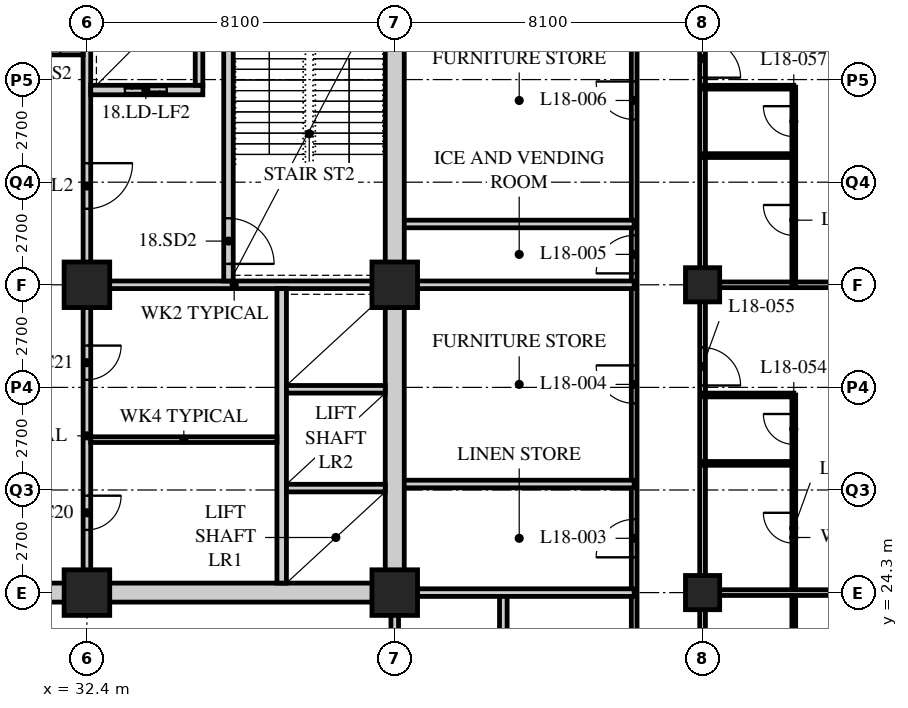
"""IFC4 building model, lengths in metres.
Left out: names, types, materials, properties, quantities, classifications, styles, units other than length and angle.
Written with IfcOpenShell. Run it as: python <this file> out.ifc"""

import sys

from ifc_helpers import new_model, si_unit, direction, frame, frame_2d, origin, origin_2d, place, context, subcontext, project, spatial, rectangle, hollow_rectangle, extrude, element, fill, save


model = new_model("IFC4")
c1 = context("Model", 3, precision=1e-05, world=origin(), true_north=direction((0.0, 1.0)))
c2 = subcontext(c1, "Body", "Model", "MODEL_VIEW")
j1 = project(units=[si_unit("LENGTHUNIT", "METRE"), si_unit("PLANEANGLEUNIT", "RADIAN")], contexts=[c1])
p1 = place(None, origin())
s1 = spatial("IfcSite", under=j1, at=p1, CompositionType="ELEMENT")
p2 = place(p1, origin())
s2 = spatial("IfcBuilding", under=s1, at=p2, CompositionType="ELEMENT")
p3 = place(p2, frame((0.0, 0.0, 73.8)))
s3 = spatial("IfcBuildingStorey", under=s2, at=p3, CompositionType="ELEMENT", Elevation=73.8)
for number, where, z_axis, x_axis in (
    (1, (32.4, 24.3, 0.0), (0.0, 0.0, 1.0), (1.0, 0.0, 0.0)),
    (2, (32.4, 32.4, 0.0), (0.0, 0.0, 1.0), (1.0, 0.0, 0.0)),
    (3, (40.5, 24.3, 0.0), (0.0, 0.0, 1.0), (1.0, 0.0, 0.0)),
    (4, (40.5, 32.4, 0.0), (0.0, 0.0, 1.0), (1.0, 0.0, 0.0)),
):
    element("IfcColumn", number, at=place(p3, frame(where, z_axis=z_axis, x_axis=x_axis)), inside=s3, PredefinedType="COLUMN", context=c2, shape_type="SweptSolid", body=[
        extrude(hollow_rectangle(XDim=1.2, YDim=1.2, WallThickness=0.12, at=origin_2d()), origin(), (0.0, 0.0, 1.0), 3.4),
    ])
for number, where, z_axis, x_axis in (
    (5, (48.6, 24.3, 0.0), (0.0, 0.0, 1.0), (1.0, 0.0, 0.0)),
    (6, (48.6, 32.4, 0.0), (0.0, 0.0, 1.0), (1.0, 0.0, 0.0)),
):
    element("IfcColumn", number, at=place(p3, frame(where, z_axis=z_axis, x_axis=x_axis)), inside=s3, PredefinedType="COLUMN", context=c2, shape_type="SweptSolid", body=[
        extrude(hollow_rectangle(XDim=0.9, YDim=0.9, WallThickness=0.09, at=origin_2d()), origin(), (0.0, 0.0, 1.0), 3.4),
    ])
p4 = place(p3, frame((48.6, 16.2, 0.0), z_axis=(0.0, 0.0, 1.0), x_axis=(0.0, 1.0, 0.0)))
e7 = element("IfcWall", 7, at=p4, inside=s3, PredefinedType="PARTITIONING", context=c2, shape_type="SweptSolid", body=[
    extrude(rectangle(XDim=26.1, YDim=0.15, at=frame_2d((13.05, 0.0))), origin(), (0.0, 0.0, 1.0), 2.578),
])
p5 = place(p4, frame((2.75, 0.0, 0.0)))
e8 = element("IfcOpeningElement", 8, at=p5, cuts=e7, PredefinedType="OPENING", context=c2, shape_type="SweptSolid", body=[
    extrude(rectangle(XDim=1.0, YDim=2.1, at=frame_2d((0.5, 1.05))), frame((0.0, 0.085, 0.0), z_axis=(0.0, -1.0, 0.0), x_axis=(1.0, 0.0, 0.0)), (0.0, 0.0, 1.0), 0.17),
])
p6 = place(p4, frame((4.65, 0.0, 0.0)))
e9 = element("IfcOpeningElement", 9, at=p6, cuts=e7, PredefinedType="OPENING", context=c2, shape_type="SweptSolid", body=[
    extrude(rectangle(XDim=1.0, YDim=2.1, at=frame_2d((0.5, 1.05))), frame((0.0, 0.085, 0.0), z_axis=(0.0, -1.0, 0.0), x_axis=(1.0, 0.0, 0.0)), (0.0, 0.0, 1.0), 0.17),
])
p7 = place(p4, frame((13.55, 0.0, 0.0)))
e10 = element("IfcOpeningElement", 10, at=p7, cuts=e7, PredefinedType="OPENING", context=c2, shape_type="SweptSolid", body=[
    extrude(rectangle(XDim=1.0, YDim=2.1, at=frame_2d((0.5, 1.05))), frame((0.0, 0.085, 0.0), z_axis=(0.0, -1.0, 0.0), x_axis=(1.0, 0.0, 0.0)), (0.0, 0.0, 1.0), 0.17),
])
p8 = place(p4, frame((21.65, 0.0, 0.0)))
e11 = element("IfcOpeningElement", 11, at=p8, cuts=e7, PredefinedType="OPENING", context=c2, shape_type="SweptSolid", body=[
    extrude(rectangle(XDim=1.0, YDim=2.1, at=frame_2d((0.5, 1.05))), frame((0.0, 0.085, 0.0), z_axis=(0.0, -1.0, 0.0), x_axis=(1.0, 0.0, 0.0)), (0.0, 0.0, 1.0), 0.17),
])
p9 = place(p3, frame((46.8, 18.0, 0.0), z_axis=(0.0, 0.0, 1.0), x_axis=(0.0, 1.0, 0.0)))
e12 = element("IfcWall", 12, at=p9, inside=s3, PredefinedType="PARTITIONING", context=c2, shape_type="SweptSolid", body=[
    extrude(rectangle(XDim=22.5, YDim=0.15, at=frame_2d((11.25, 0.0))), origin(), (0.0, 0.0, 1.0), 3.19),
])
p10 = place(p9, frame((7.229, 0.0, 0.0)))
e13 = element("IfcOpeningElement", 13, at=p10, cuts=e12, PredefinedType="OPENING", context=c2, shape_type="SweptSolid", body=[
    extrude(rectangle(XDim=1.0, YDim=2.1, at=frame_2d((0.5, 1.05))), frame((0.0, 0.085, 0.0), z_axis=(0.0, -1.0, 0.0), x_axis=(1.0, 0.0, 0.0)), (0.0, 0.0, 1.0), 0.17),
])
p11 = place(p9, frame((11.279, 0.0, 0.0)))
e14 = element("IfcOpeningElement", 14, at=p11, cuts=e12, PredefinedType="OPENING", context=c2, shape_type="SweptSolid", body=[
    extrude(rectangle(XDim=1.0, YDim=2.1, at=frame_2d((0.5, 1.05))), frame((0.0, 0.085, 0.0), z_axis=(0.0, -1.0, 0.0), x_axis=(1.0, 0.0, 0.0)), (0.0, 0.0, 1.0), 0.17),
])
p12 = place(p9, frame((14.7, 0.0, 0.0)))
e15 = element("IfcOpeningElement", 15, at=p12, cuts=e12, PredefinedType="OPENING", context=c2, shape_type="SweptSolid", body=[
    extrude(rectangle(XDim=1.0, YDim=2.1, at=frame_2d((0.5, 1.05))), frame((0.0, 0.085, 0.0), z_axis=(0.0, -1.0, 0.0), x_axis=(1.0, 0.0, 0.0)), (0.0, 0.0, 1.0), 0.17),
])
p13 = place(p9, frame((18.75, 0.0, 0.0)))
e16 = element("IfcOpeningElement", 16, at=p13, cuts=e12, PredefinedType="OPENING", context=c2, shape_type="SweptSolid", body=[
    extrude(rectangle(XDim=1.0, YDim=2.1, at=frame_2d((0.5, 1.05))), frame((0.0, 0.085, 0.0), z_axis=(0.0, -1.0, 0.0), x_axis=(1.0, 0.0, 0.0)), (0.0, 0.0, 1.0), 0.17),
])
p14 = place(p3, frame((40.5, 32.4, 0.0), z_axis=(0.0, 0.0, 1.0), x_axis=(1.0, 0.0, 0.0)))
e17 = element("IfcWall", 17, at=p14, inside=s3, PredefinedType="SOLIDWALL", context=c2, shape_type="SweptSolid", body=[
    extrude(rectangle(XDim=6.3, YDim=0.2, at=frame_2d((3.15, 0.0))), origin(), (0.0, 0.0, 1.0), 2.578),
])
for number, where, z_axis, x_axis in (
    (18, (46.8, 27.157, 0.0), (0.0, 0.0, 1.0), (-1.0, 0.0, 0.0)),
    (19, (46.8, 34.0, 0.0), (0.0, 0.0, 1.0), (-1.0, 0.0, 0.0)),
):
    element("IfcWall", number, at=place(p3, frame(where, z_axis=z_axis, x_axis=x_axis)), inside=s3, PredefinedType="SOLIDWALL", context=c2, shape_type="SweptSolid", body=[
        extrude(rectangle(XDim=6.3, YDim=0.2, at=frame_2d((3.15, 0.0))), origin(), (0.0, 0.0, 1.0), 3.19),
    ])
p15 = place(p3, frame((40.5, 18.0, 0.0), z_axis=(0.0, 0.0, 1.0), x_axis=(0.0, 1.0, 0.0)))
e20 = element("IfcWall", 20, at=p15, inside=s3, PredefinedType="SOLIDWALL", context=c2, shape_type="SweptSolid", body=[
    extrude(rectangle(XDim=6.3, YDim=0.2, at=frame_2d((3.15, 0.0))), origin(), (0.0, 0.0, 1.0), 2.578),
])
p16 = place(p3, frame((43.357, 18.0, 0.0), z_axis=(0.0, 0.0, 1.0), x_axis=(0.0, 1.0, 0.0)))
e21 = element("IfcWall", 21, at=p16, inside=s3, PredefinedType="SOLIDWALL", context=c2, shape_type="SweptSolid", body=[
    extrude(rectangle(XDim=6.3, YDim=0.2, at=frame_2d((3.15, 0.0))), origin(), (0.0, 0.0, 1.0), 3.19),
])
p17 = place(p3, frame((40.5, 24.3, 0.0), z_axis=(0.0, 0.0, 1.0), x_axis=(1.0, 0.0, 0.0)))
e22 = element("IfcWall", 22, at=p17, inside=s3, PredefinedType="SOLIDWALL", context=c2, shape_type="SweptSolid", body=[
    extrude(rectangle(XDim=6.3, YDim=0.2, at=frame_2d((3.15, 0.0))), origin(), (0.0, 0.0, 1.0), 2.578),
])
p18 = place(p3, frame((51.0, 22.0, 0.0), z_axis=(0.0, 0.0, 1.0), x_axis=(0.0, 1.0, 0.0)))
e23 = element("IfcWall", 23, at=p18, inside=s3, PredefinedType="PARTITIONING", context=c2, shape_type="SweptSolid", body=[
    extrude(rectangle(XDim=7.5, YDim=0.1, at=frame_2d((3.75, 0.0))), origin(), (0.0, 0.0, 1.0), 3.19),
])
p19 = place(p18, frame((3.6, 0.0, 0.0)))
e24 = element("IfcOpeningElement", 24, at=p19, cuts=e23, PredefinedType="OPENING", context=c2, shape_type="SweptSolid", body=[
    extrude(rectangle(XDim=0.8, YDim=2.1, at=frame_2d((0.4, 1.05))), frame((0.0, 0.06, 0.0), z_axis=(0.0, -1.0, 0.0), x_axis=(1.0, 0.0, 0.0)), (0.0, 0.0, 1.0), 0.12),
])
p20 = place(p18, frame((6.2, 0.0, 0.0)))
e25 = element("IfcOpeningElement", 25, at=p20, cuts=e23, PredefinedType="OPENING", context=c2, shape_type="SweptSolid", body=[
    extrude(rectangle(XDim=0.8, YDim=2.1, at=frame_2d((0.4, 1.05))), frame((0.0, 0.06, 0.0), z_axis=(0.0, -1.0, 0.0), x_axis=(1.0, 0.0, 0.0)), (0.0, 0.0, 1.0), 0.12),
])
p21 = place(p3, frame((48.6, 24.3, 0.0), z_axis=(0.0, 0.0, 1.0), x_axis=(1.0, 0.0, 0.0)))
e26 = element("IfcWall", 26, at=p21, inside=s3, PredefinedType="PARTITIONING", context=c2, shape_type="SweptSolid", body=[
    extrude(rectangle(XDim=7.8, YDim=0.15, at=frame_2d((3.9, 0.0))), origin(), (0.0, 0.0, 1.0), 2.578),
])
for number, where, z_axis, x_axis in (
    (27, (48.6, 27.7, 0.0), (0.0, 0.0, 1.0), (1.0, 0.0, 0.0)),
    (28, (48.6, 29.5, 0.0), (0.0, 0.0, 1.0), (1.0, 0.0, 0.0)),
):
    element("IfcWall", number, at=place(p3, frame(where, z_axis=z_axis, x_axis=x_axis)), inside=s3, PredefinedType="PARTITIONING", context=c2, shape_type="SweptSolid", body=[
        extrude(rectangle(XDim=2.4, YDim=0.1, at=frame_2d((1.2, 0.0))), origin(), (0.0, 0.0, 1.0), 3.19),
    ])
p22 = place(p3, frame((48.6, 32.4, 0.0), z_axis=(0.0, 0.0, 1.0), x_axis=(1.0, 0.0, 0.0)))
e29 = element("IfcWall", 29, at=p22, inside=s3, PredefinedType="PARTITIONING", context=c2, shape_type="SweptSolid", body=[
    extrude(rectangle(XDim=7.8, YDim=0.15, at=frame_2d((3.9, 0.0))), origin(), (0.0, 0.0, 1.0), 2.578),
])
p23 = place(p3, frame((51.0, 32.4, 0.0), z_axis=(0.0, 0.0, 1.0), x_axis=(0.0, 1.0, 0.0)))
e30 = element("IfcWall", 30, at=p23, inside=s3, PredefinedType="PARTITIONING", context=c2, shape_type="SweptSolid", body=[
    extrude(rectangle(XDim=5.2, YDim=0.1, at=frame_2d((2.6, 0.0))), origin(), (0.0, 0.0, 1.0), 3.19),
])
p24 = place(p23, frame((1.3, 0.0, 0.0)))
e31 = element("IfcOpeningElement", 31, at=p24, cuts=e30, PredefinedType="OPENING", context=c2, shape_type="SweptSolid", body=[
    extrude(rectangle(XDim=0.8, YDim=2.1, at=frame_2d((0.4, 1.05))), frame((0.0, 0.06, 0.0), z_axis=(0.0, -1.0, 0.0), x_axis=(1.0, 0.0, 0.0)), (0.0, 0.0, 1.0), 0.12),
])
p25 = place(p23, frame((3.9, 0.0, 0.0)))
e32 = element("IfcOpeningElement", 32, at=p25, cuts=e30, PredefinedType="OPENING", context=c2, shape_type="SweptSolid", body=[
    extrude(rectangle(XDim=0.8, YDim=2.1, at=frame_2d((0.4, 1.05))), frame((0.0, 0.06, 0.0), z_axis=(0.0, -1.0, 0.0), x_axis=(1.0, 0.0, 0.0)), (0.0, 0.0, 1.0), 0.12),
])
for number, where, z_axis, x_axis in (
    (33, (48.6, 35.8, 0.0), (0.0, 0.0, 1.0), (1.0, 0.0, 0.0)),
    (34, (48.6, 37.6, 0.0), (0.0, 0.0, 1.0), (1.0, 0.0, 0.0)),
):
    element("IfcWall", number, at=place(p3, frame(where, z_axis=z_axis, x_axis=x_axis)), inside=s3, PredefinedType="PARTITIONING", context=c2, shape_type="SweptSolid", body=[
        extrude(rectangle(XDim=2.4, YDim=0.1, at=frame_2d((1.2, 0.0))), origin(), (0.0, 0.0, 1.0), 3.19),
    ])
p26 = place(p3, frame((15.95, 24.3, 0.0), z_axis=(0.0, 0.0, 1.0), x_axis=(1.0, 0.0, 0.0)))
e35 = element("IfcWall", 35, at=p26, inside=s3, PredefinedType="SOLIDWALL", context=c2, shape_type="SweptSolid", body=[
    extrude(rectangle(XDim=24.8, YDim=0.5, at=frame_2d((12.4, 0.0))), origin(), (0.0, 0.0, 1.0), 2.54),
])
p27 = place(p26, frame((11.5, 0.0, 0.0)))
e36 = element("IfcOpeningElement", 36, at=p27, cuts=e35, PredefinedType="OPENING", context=c2, shape_type="SweptSolid", body=[
    extrude(rectangle(XDim=1.8, YDim=2.4, at=frame_2d((0.9, 1.2))), frame((0.0, 0.26, 0.0), z_axis=(0.0, -1.0, 0.0), x_axis=(1.0, 0.0, 0.0)), (0.0, 0.0, 1.0), 0.52),
])
p28 = place(p3, frame((40.5, 24.55, 0.0), z_axis=(0.0, 0.0, 1.0), x_axis=(0.0, 1.0, 0.0)))
e37 = element("IfcWall", 37, at=p28, inside=s3, PredefinedType="SOLIDWALL", context=c2, shape_type="SweptSolid", body=[
    extrude(rectangle(XDim=15.7, YDim=0.5, at=frame_2d((7.85, 0.0))), origin(), (0.0, 0.0, 1.0), 2.578),
])
p29 = place(p3, frame((32.3, 32.4, 0.0), z_axis=(0.0, 0.0, 1.0), x_axis=(1.0, 0.0, 0.0)))
e38 = element("IfcWall", 38, at=p29, inside=s3, PredefinedType="SOLIDWALL", context=c2, shape_type="SweptSolid", body=[
    extrude(rectangle(XDim=7.95, YDim=0.2, at=frame_2d((3.975, 0.0))), origin(), (0.0, 0.0, 1.0), 2.578),
])
p30 = place(p3, frame((32.4, 32.5, 0.0), z_axis=(0.0, 0.0, 1.0), x_axis=(0.0, 1.0, 0.0)))
e39 = element("IfcWall", 39, at=p30, inside=s3, PredefinedType="SOLIDWALL", context=c2, shape_type="SweptSolid", body=[
    extrude(rectangle(XDim=7.75, YDim=0.2, at=frame_2d((3.875, 0.0))), origin(), (0.0, 0.0, 1.0), 2.578),
])
p31 = place(p30, frame((1.9, 0.0, 0.0)))
e40 = element("IfcOpeningElement", 40, at=p31, cuts=e39, PredefinedType="OPENING", context=c2, shape_type="SweptSolid", body=[
    extrude(rectangle(XDim=1.2, YDim=2.1, at=frame_2d((0.6, 1.05))), frame((0.0, 0.11, 0.0), z_axis=(0.0, -1.0, 0.0), x_axis=(1.0, 0.0, 0.0)), (0.0, 0.0, 1.0), 0.22),
])
p32 = place(p3, frame((37.525, 24.55, 0.0), z_axis=(0.0, 0.0, 1.0), x_axis=(0.0, 1.0, 0.0)))
e41 = element("IfcWall", 41, at=p32, inside=s3, PredefinedType="SOLIDWALL", context=c2, shape_type="SweptSolid", body=[
    extrude(rectangle(XDim=7.75, YDim=0.25, at=frame_2d((3.875, 0.0))), origin(), (0.0, 0.0, 1.0), 3.19),
])
for number, where, z_axis, x_axis in (
    (42, (37.65, 27.05, 0.0), (0.0, 0.0, 1.0), (1.0, 0.0, 0.0)),
    (43, (37.65, 29.65, 0.0), (0.0, 0.0, 1.0), (1.0, 0.0, 0.0)),
):
    element("IfcWall", number, at=place(p3, frame(where, z_axis=z_axis, x_axis=x_axis)), inside=s3, PredefinedType="SOLIDWALL", context=c2, shape_type="SweptSolid", body=[
        extrude(rectangle(XDim=2.6, YDim=0.2, at=frame_2d((1.3, 0.0))), origin(), (0.0, 0.0, 1.0), 3.19),
    ])
p33 = place(p3, frame((36.125, 32.5, 0.0), z_axis=(0.0, 0.0, 1.0), x_axis=(0.0, 1.0, 0.0)))
e44 = element("IfcWall", 44, at=p33, inside=s3, PredefinedType="SOLIDWALL", context=c2, shape_type="SweptSolid", body=[
    extrude(rectangle(XDim=7.75, YDim=0.25, at=frame_2d((3.875, 0.0))), origin(), (0.0, 0.0, 1.0), 3.19),
])
p34 = place(p33, frame((0.45, 0.0, 0.0)))
e45 = element("IfcOpeningElement", 45, at=p34, cuts=e44, PredefinedType="OPENING", context=c2, shape_type="SweptSolid", body=[
    extrude(rectangle(XDim=1.2, YDim=2.1, at=frame_2d((0.6, 1.05))), frame((0.0, 0.135, 0.0), z_axis=(0.0, -1.0, 0.0), x_axis=(1.0, 0.0, 0.0)), (0.0, 0.0, 1.0), 0.27),
])
p35 = place(p3, frame((32.5, 37.525, 0.0), z_axis=(0.0, 0.0, 1.0), x_axis=(1.0, 0.0, 0.0)))
e46 = element("IfcWall", 46, at=p35, inside=s3, PredefinedType="SOLIDWALL", context=c2, shape_type="SweptSolid", body=[
    extrude(rectangle(XDim=2.95, YDim=0.25, at=frame_2d((1.475, 0.0))), origin(), (0.0, 0.0, 1.0), 3.19),
])
p36 = place(p35, frame((0.9, 0.0, 0.0)))
e47 = element("IfcOpeningElement", 47, at=p36, cuts=e46, PredefinedType="OPENING", context=c2, shape_type="SweptSolid", body=[
    extrude(rectangle(XDim=1.1, YDim=2.4, at=frame_2d((0.55, 1.2))), frame((0.0, 0.135, 0.0), z_axis=(0.0, -1.0, 0.0), x_axis=(1.0, 0.0, 0.0)), (0.0, 0.0, 1.0), 0.27),
])
p37 = place(p3, frame((35.35, 37.65, 0.0), z_axis=(0.0, 0.0, 1.0), x_axis=(0.0, 1.0, 0.0)))
e48 = element("IfcWall", 48, at=p37, inside=s3, PredefinedType="SOLIDWALL", context=c2, shape_type="SweptSolid", body=[
    extrude(rectangle(XDim=2.6, YDim=0.2, at=frame_2d((1.3, 0.0))), origin(), (0.0, 0.0, 1.0), 3.19),
])
p38 = place(p3, frame((30.15, 38.55, 0.0), z_axis=(0.0, 0.0, 1.0), x_axis=(1.0, 0.0, 0.0)))
e49 = element("IfcWall", 49, at=p38, inside=s3, PredefinedType="SOLIDWALL", context=c2, shape_type="SweptSolid", body=[
    extrude(rectangle(XDim=2.15, YDim=0.2, at=frame_2d((1.075, 0.0))), origin(), (0.0, 0.0, 1.0), 3.19),
])
p39 = place(p38, frame((0.65, 0.0, 0.0)))
e50 = element("IfcOpeningElement", 50, at=p39, cuts=e49, PredefinedType="OPENING", context=c2, shape_type="SweptSolid", body=[
    extrude(rectangle(XDim=0.9, YDim=2.1, at=frame_2d((0.45, 1.05))), frame((0.0, 0.11, 0.0), z_axis=(0.0, -1.0, 0.0), x_axis=(1.0, 0.0, 0.0)), (0.0, 0.0, 1.0), 0.22),
])
p40 = place(p3, frame((32.4, 24.55, 0.0), z_axis=(0.0, 0.0, 1.0), x_axis=(0.0, 1.0, 0.0)))
e51 = element("IfcWall", 51, at=p40, inside=s3, PredefinedType="PARTITIONING", context=c2, shape_type="SweptSolid", body=[
    extrude(rectangle(XDim=7.75, YDim=0.2, at=frame_2d((3.875, 0.0))), origin(), (0.0, 0.0, 1.0), 2.578),
])
p41 = place(p40, frame((1.4, 0.0, 0.0)))
e52 = element("IfcOpeningElement", 52, at=p41, cuts=e51, PredefinedType="OPENING", context=c2, shape_type="SweptSolid", body=[
    extrude(rectangle(XDim=0.9, YDim=2.1, at=frame_2d((0.45, 1.05))), frame((0.0, 0.11, 0.0), z_axis=(0.0, -1.0, 0.0), x_axis=(1.0, 0.0, 0.0)), (0.0, 0.0, 1.0), 0.22),
])
p42 = place(p40, frame((5.35, 0.0, 0.0)))
e53 = element("IfcOpeningElement", 53, at=p42, cuts=e51, PredefinedType="OPENING", context=c2, shape_type="SweptSolid", body=[
    extrude(rectangle(XDim=0.9, YDim=2.1, at=frame_2d((0.45, 1.05))), frame((0.0, 0.11, 0.0), z_axis=(0.0, -1.0, 0.0), x_axis=(1.0, 0.0, 0.0)), (0.0, 0.0, 1.0), 0.22),
])
p43 = place(p3, frame((32.5, 28.325, 0.0), z_axis=(0.0, 0.0, 1.0), x_axis=(1.0, 0.0, 0.0)))
e54 = element("IfcWall", 54, at=p43, inside=s3, PredefinedType="PARTITIONING", context=c2, shape_type="SweptSolid", body=[
    extrude(rectangle(XDim=4.9, YDim=0.15, at=frame_2d((2.45, 0.0))), origin(), (0.0, 0.0, 1.0), 3.19),
])
p44 = place(p10, origin())
e55 = element("IfcDoor", 55, at=p44, inside=s3, OperationType="SINGLE_SWING_LEFT", PredefinedType="DOOR", context=c2, shape_type="SweptSolid", body=[
    extrude(rectangle(XDim=1.0, YDim=2.1, at=frame_2d((0.5, 1.05))), frame((0.0, 0.025, 0.0), z_axis=(0.0, -1.0, 0.0), x_axis=(1.0, 0.0, 0.0)), (0.0, 0.0, 1.0), 0.05),
])
fill(e13, e55)
p45 = place(p11, origin())
e56 = element("IfcDoor", 56, at=p45, inside=s3, OperationType="SINGLE_SWING_RIGHT", PredefinedType="DOOR", context=c2, shape_type="SweptSolid", body=[
    extrude(rectangle(XDim=1.0, YDim=2.1, at=frame_2d((0.5, 1.05))), frame((0.0, 0.025, 0.0), z_axis=(0.0, -1.0, 0.0), x_axis=(1.0, 0.0, 0.0)), (0.0, 0.0, 1.0), 0.05),
])
fill(e14, e56)
p46 = place(p12, origin())
e57 = element("IfcDoor", 57, at=p46, inside=s3, OperationType="SINGLE_SWING_LEFT", PredefinedType="DOOR", context=c2, shape_type="SweptSolid", body=[
    extrude(rectangle(XDim=1.0, YDim=2.1, at=frame_2d((0.5, 1.05))), frame((0.0, 0.025, 0.0), z_axis=(0.0, -1.0, 0.0), x_axis=(1.0, 0.0, 0.0)), (0.0, 0.0, 1.0), 0.05),
])
fill(e15, e57)
p47 = place(p13, origin())
e58 = element("IfcDoor", 58, at=p47, inside=s3, OperationType="SINGLE_SWING_RIGHT", PredefinedType="DOOR", context=c2, shape_type="SweptSolid", body=[
    extrude(rectangle(XDim=1.0, YDim=2.1, at=frame_2d((0.5, 1.05))), frame((0.0, 0.025, 0.0), z_axis=(0.0, -1.0, 0.0), x_axis=(1.0, 0.0, 0.0)), (0.0, 0.0, 1.0), 0.05),
])
fill(e16, e58)
p48 = place(p19, origin())
e59 = element("IfcDoor", 59, at=p48, inside=s3, OperationType="SINGLE_SWING_RIGHT", PredefinedType="DOOR", context=c2, shape_type="SweptSolid", body=[
    extrude(rectangle(XDim=0.8, YDim=2.1, at=frame_2d((0.4, 1.05))), frame((0.0, 0.025, 0.0), z_axis=(0.0, -1.0, 0.0), x_axis=(1.0, 0.0, 0.0)), (0.0, 0.0, 1.0), 0.05),
])
fill(e24, e59)
p49 = place(p20, origin())
e60 = element("IfcDoor", 60, at=p49, inside=s3, OperationType="SINGLE_SWING_RIGHT", PredefinedType="DOOR", context=c2, shape_type="SweptSolid", body=[
    extrude(rectangle(XDim=0.8, YDim=2.1, at=frame_2d((0.4, 1.05))), frame((0.0, 0.025, 0.0), z_axis=(0.0, -1.0, 0.0), x_axis=(1.0, 0.0, 0.0)), (0.0, 0.0, 1.0), 0.05),
])
fill(e25, e60)
p50 = place(p7, origin())
e61 = element("IfcDoor", 61, at=p50, inside=s3, OperationType="SINGLE_SWING_RIGHT", PredefinedType="DOOR", context=c2, shape_type="SweptSolid", body=[
    extrude(rectangle(XDim=1.0, YDim=2.1, at=frame_2d((0.5, 1.05))), frame((0.0, 0.025, 0.0), z_axis=(0.0, -1.0, 0.0), x_axis=(1.0, 0.0, 0.0)), (0.0, 0.0, 1.0), 0.05),
])
fill(e10, e61)
p51 = place(p24, origin())
e62 = element("IfcDoor", 62, at=p51, inside=s3, OperationType="SINGLE_SWING_RIGHT", PredefinedType="DOOR", context=c2, shape_type="SweptSolid", body=[
    extrude(rectangle(XDim=0.8, YDim=2.1, at=frame_2d((0.4, 1.05))), frame((0.0, 0.025, 0.0), z_axis=(0.0, -1.0, 0.0), x_axis=(1.0, 0.0, 0.0)), (0.0, 0.0, 1.0), 0.05),
])
fill(e31, e62)
p52 = place(p25, origin())
e63 = element("IfcDoor", 63, at=p52, inside=s3, OperationType="SINGLE_SWING_RIGHT", PredefinedType="DOOR", context=c2, shape_type="SweptSolid", body=[
    extrude(rectangle(XDim=0.8, YDim=2.1, at=frame_2d((0.4, 1.05))), frame((0.0, 0.025, 0.0), z_axis=(0.0, -1.0, 0.0), x_axis=(1.0, 0.0, 0.0)), (0.0, 0.0, 1.0), 0.05),
])
fill(e32, e63)
p53 = place(p8, origin())
e64 = element("IfcDoor", 64, at=p53, inside=s3, OperationType="SINGLE_SWING_RIGHT", PredefinedType="DOOR", context=c2, shape_type="SweptSolid", body=[
    extrude(rectangle(XDim=1.0, YDim=2.1, at=frame_2d((0.5, 1.05))), frame((0.0, 0.025, 0.0), z_axis=(0.0, -1.0, 0.0), x_axis=(1.0, 0.0, 0.0)), (0.0, 0.0, 1.0), 0.05),
])
fill(e11, e64)
p54 = place(p41, origin())
e65 = element("IfcDoor", 65, at=p54, inside=s3, OperationType="SINGLE_SWING_LEFT", PredefinedType="DOOR", context=c2, shape_type="SweptSolid", body=[
    extrude(rectangle(XDim=0.9, YDim=2.1, at=frame_2d((0.45, 1.05))), frame((0.0, 0.025, 0.0), z_axis=(0.0, -1.0, 0.0), x_axis=(1.0, 0.0, 0.0)), (0.0, 0.0, 1.0), 0.05),
])
fill(e52, e65)
p55 = place(p42, origin())
e66 = element("IfcDoor", 66, at=p55, inside=s3, OperationType="SINGLE_SWING_LEFT", PredefinedType="DOOR", context=c2, shape_type="SweptSolid", body=[
    extrude(rectangle(XDim=0.9, YDim=2.1, at=frame_2d((0.45, 1.05))), frame((0.0, 0.025, 0.0), z_axis=(0.0, -1.0, 0.0), x_axis=(1.0, 0.0, 0.0)), (0.0, 0.0, 1.0), 0.05),
])
fill(e53, e66)
p56 = place(p34, origin())
e67 = element("IfcDoor", 67, at=p56, inside=s3, OperationType="SINGLE_SWING_RIGHT", PredefinedType="DOOR", context=c2, shape_type="SweptSolid", body=[
    extrude(rectangle(XDim=1.2, YDim=2.1, at=frame_2d((0.6, 1.05))), frame((0.0, 0.025, 0.0), z_axis=(0.0, -1.0, 0.0), x_axis=(1.0, 0.0, 0.0)), (0.0, 0.0, 1.0), 0.05),
])
fill(e45, e67)
p57 = place(p31, origin())
e68 = element("IfcDoor", 68, at=p57, inside=s3, OperationType="SINGLE_SWING_LEFT", PredefinedType="DOOR", context=c2, shape_type="SweptSolid", body=[
    extrude(rectangle(XDim=1.2, YDim=2.1, at=frame_2d((0.6, 1.05))), frame((0.0, 0.025, 0.0), z_axis=(0.0, -1.0, 0.0), x_axis=(1.0, 0.0, 0.0)), (0.0, 0.0, 1.0), 0.05),
])
fill(e40, e68)
p58 = place(p36, origin())
e69 = element("IfcDoor", 69, at=p58, inside=s3, OperationType="DOUBLE_DOOR_SLIDING", PredefinedType="DOOR", context=c2, shape_type="SweptSolid", body=[
    extrude(rectangle(XDim=1.1, YDim=2.4, at=frame_2d((0.55, 1.2))), frame((0.0, 0.025, 0.0), z_axis=(0.0, -1.0, 0.0), x_axis=(1.0, 0.0, 0.0)), (0.0, 0.0, 1.0), 0.05),
])
fill(e47, e69)
save(model, sys.argv[1])
